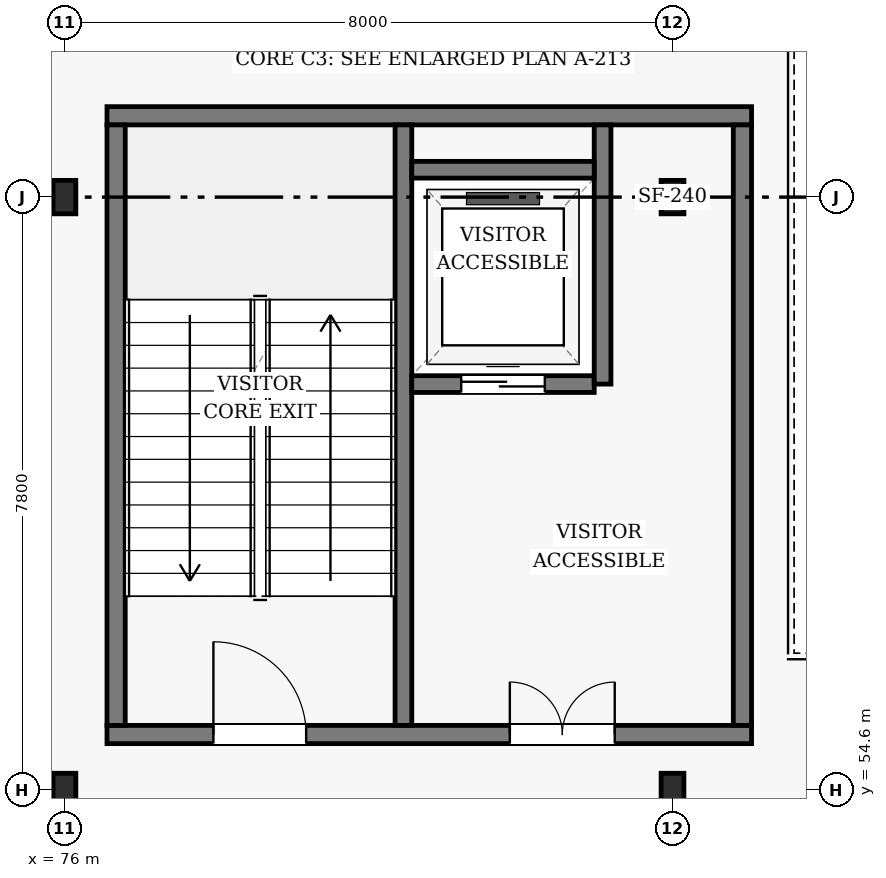
"""IFC4 building model, lengths in metres.
Left out: names, types, materials, properties, quantities, classifications, styles, units other than length and angle.
Written with IfcOpenShell. Run it as: python <this file> out.ifc"""

import sys

from ifc_helpers import new_model, si_unit, direction, frame, frame_2d, origin, origin_2d, place, context, subcontext, project, spatial, rectangle, i_section, extrude, element, fill, save


model = new_model("IFC4")
c1 = context("Model", 3, precision=1e-05, world=origin(), true_north=direction((0.0, 1.0)))
c2 = subcontext(c1, "Body", "Model", "MODEL_VIEW")
j1 = project(units=[si_unit("LENGTHUNIT", "METRE"), si_unit("PLANEANGLEUNIT", "RADIAN")], contexts=[c1])
p1 = place(None, origin())
s1 = spatial("IfcSite", under=j1, at=p1, CompositionType="ELEMENT")
p2 = place(p1, origin())
s2 = spatial("IfcBuilding", under=s1, at=p2, CompositionType="ELEMENT")
p3 = place(p2, frame((0.0, 0.0, 4.8)))
s3 = spatial("IfcBuildingStorey", under=s2, at=p3, CompositionType="ELEMENT", Elevation=4.8)
for number, where, z_axis, x_axis in (
    (1, (76.0, 54.6, 0.0), (0.0, 0.0, 1.0), (1.0, 0.0, 0.0)),
    (2, (76.0, 62.4, 0.0), (0.0, 0.0, 1.0), (1.0, 0.0, 0.0)),
    (3, (84.0, 54.6, 0.0), (0.0, 0.0, 1.0), (1.0, 0.0, 0.0)),
    (4, (84.0, 62.4, 0.0), (0.0, 0.0, 1.0), (1.0, 0.0, 0.0)),
):
    element("IfcColumn", number, at=place(p3, frame(where, z_axis=z_axis, x_axis=x_axis)), inside=s3, PredefinedType="COLUMN", context=c2, shape_type="SweptSolid", body=[
        extrude(i_section(OverallWidth=0.3, OverallDepth=0.44, WebThickness=0.011, FlangeThickness=0.018, FilletRadius=0.024, at=origin_2d()), origin(), (0.0, 0.0, 1.0), 4.2),
    ])
p4 = place(p3, frame((76.56, 55.33, 0.0), z_axis=(0.0, 0.0, 1.0), x_axis=(1.0, 0.0, 0.0)))
e5 = element("IfcWall", 5, at=p4, inside=s3, PredefinedType="SHEAR", context=c2, shape_type="SweptSolid", body=[
    extrude(rectangle(XDim=8.48, YDim=0.24, at=frame_2d((4.24, 0.0))), origin(), (0.0, 0.0, 1.0), 3.955),
])
p5 = place(p4, frame((1.4, 0.0, 0.0)))
e6 = element("IfcOpeningElement", 6, at=p5, cuts=e5, PredefinedType="OPENING", context=c2, shape_type="SweptSolid", body=[
    extrude(rectangle(XDim=1.22, YDim=2.18, at=frame_2d((0.61, 1.09))), frame((0.0, 0.13, 0.0), z_axis=(0.0, -1.0, 0.0), x_axis=(1.0, 0.0, 0.0)), (0.0, 0.0, 1.0), 0.26),
])
p6 = place(p4, frame((5.3, 0.0, 0.0)))
e7 = element("IfcOpeningElement", 7, at=p6, cuts=e5, PredefinedType="OPENING", context=c2, shape_type="SweptSolid", body=[
    extrude(rectangle(XDim=1.38, YDim=2.15, at=frame_2d((0.69, 1.075))), frame((0.0, 0.13, 0.0), z_axis=(0.0, -1.0, 0.0), x_axis=(1.0, 0.0, 0.0)), (0.0, 0.0, 1.0), 0.26),
])
p7 = place(p3, frame((76.56, 63.47, 0.0), z_axis=(0.0, 0.0, 1.0), x_axis=(1.0, 0.0, 0.0)))
e8 = element("IfcWall", 8, at=p7, inside=s3, PredefinedType="SHEAR", context=c2, shape_type="SweptSolid", body=[
    extrude(rectangle(XDim=8.48, YDim=0.24, at=frame_2d((4.24, 0.0))), origin(), (0.0, 0.0, 1.0), 3.955),
])
p8 = place(p3, frame((76.68, 55.45, 0.0), z_axis=(0.0, 0.0, 1.0), x_axis=(0.0, 1.0, 0.0)))
e9 = element("IfcWall", 9, at=p8, inside=s3, PredefinedType="SHEAR", context=c2, shape_type="SweptSolid", body=[
    extrude(rectangle(XDim=7.9, YDim=0.24, at=frame_2d((3.95, 0.0))), origin(), (0.0, 0.0, 1.0), 3.955),
])
p9 = place(p3, frame((80.46, 55.45, 0.0), z_axis=(0.0, 0.0, 1.0), x_axis=(0.0, 1.0, 0.0)))
e10 = element("IfcWall", 10, at=p9, inside=s3, PredefinedType="SHEAR", context=c2, shape_type="SweptSolid", body=[
    extrude(rectangle(XDim=7.9, YDim=0.22, at=frame_2d((3.95, 0.0))), origin(), (0.0, 0.0, 1.0), 3.955),
])
p10 = place(p3, frame((84.92, 55.45, 0.0), z_axis=(0.0, 0.0, 1.0), x_axis=(0.0, 1.0, 0.0)))
e11 = element("IfcWall", 11, at=p10, inside=s3, PredefinedType="SHEAR", context=c2, shape_type="SweptSolid", body=[
    extrude(rectangle(XDim=7.9, YDim=0.24, at=frame_2d((3.95, 0.0))), origin(), (0.0, 0.0, 1.0), 3.955),
])
p11 = place(p3, frame((80.57, 59.94, 0.0), z_axis=(0.0, 0.0, 1.0), x_axis=(1.0, 0.0, 0.0)))
e12 = element("IfcWall", 12, at=p11, inside=s3, PredefinedType="SHEAR", context=c2, shape_type="SweptSolid", body=[
    extrude(rectangle(XDim=2.4, YDim=0.22, at=frame_2d((1.2, 0.0))), origin(), (0.0, 0.0, 1.0), 3.955),
])
p12 = place(p11, frame((0.65, 0.0, 0.0)))
e13 = element("IfcOpeningElement", 13, at=p12, cuts=e12, PredefinedType="OPENING", context=c2, shape_type="SweptSolid", body=[
    extrude(rectangle(XDim=1.1, YDim=2.15, at=frame_2d((0.55, 1.075))), frame((0.0, 0.12, 0.0), z_axis=(0.0, -1.0, 0.0), x_axis=(1.0, 0.0, 0.0)), (0.0, 0.0, 1.0), 0.24),
])
p13 = place(p3, frame((83.08, 59.94, 0.0), z_axis=(0.0, 0.0, 1.0), x_axis=(0.0, 1.0, 0.0)))
e14 = element("IfcWall", 14, at=p13, inside=s3, PredefinedType="SHEAR", context=c2, shape_type="SweptSolid", body=[
    extrude(rectangle(XDim=3.41, YDim=0.22, at=frame_2d((1.705, 0.0))), origin(), (0.0, 0.0, 1.0), 3.955),
])
p14 = place(p3, frame((80.57, 62.76, 0.0), z_axis=(0.0, 0.0, 1.0), x_axis=(1.0, 0.0, 0.0)))
e15 = element("IfcWall", 15, at=p14, inside=s3, PredefinedType="SHEAR", context=c2, shape_type="SweptSolid", body=[
    extrude(rectangle(XDim=2.4, YDim=0.22, at=frame_2d((1.2, 0.0))), origin(), (0.0, 0.0, 1.0), 3.955),
])
p15 = place(p5, origin())
e16 = element("IfcDoor", 16, at=p15, inside=s3, OperationType="SINGLE_SWING_LEFT", PredefinedType="DOOR", context=c2, shape_type="SweptSolid", body=[
    extrude(rectangle(XDim=1.22, YDim=2.18, at=frame_2d((0.61, 1.09))), frame((0.0, 0.025, 0.0), z_axis=(0.0, -1.0, 0.0), x_axis=(1.0, 0.0, 0.0)), (0.0, 0.0, 1.0), 0.05),
])
fill(e6, e16)
p16 = place(p6, frame((1.38, 0.0, 0.0), z_axis=(0.0, 0.0, 1.0), x_axis=(-1.0, 0.0, 0.0)))
e17 = element("IfcDoor", 17, at=p16, inside=s3, OperationType="DOUBLE_DOOR_SINGLE_SWING", PredefinedType="DOOR", context=c2, shape_type="SweptSolid", body=[
    extrude(rectangle(XDim=1.38, YDim=2.15, at=frame_2d((0.69, 1.075))), frame((0.0, 0.025, 0.0), z_axis=(0.0, -1.0, 0.0), x_axis=(1.0, 0.0, 0.0)), (0.0, 0.0, 1.0), 0.05),
])
fill(e7, e17)
p17 = place(p12, origin())
e18 = element("IfcDoor", 18, at=p17, inside=s3, OperationType="SLIDING_TO_LEFT", PredefinedType="DOOR", context=c2, shape_type="SweptSolid", body=[
    extrude(rectangle(XDim=1.1, YDim=2.15, at=frame_2d((0.55, 1.075))), frame((0.0, 0.025, 0.0), z_axis=(0.0, -1.0, 0.0), x_axis=(1.0, 0.0, 0.0)), (0.0, 0.0, 1.0), 0.05),
])
fill(e13, e18)
save(model, sys.argv[1])
